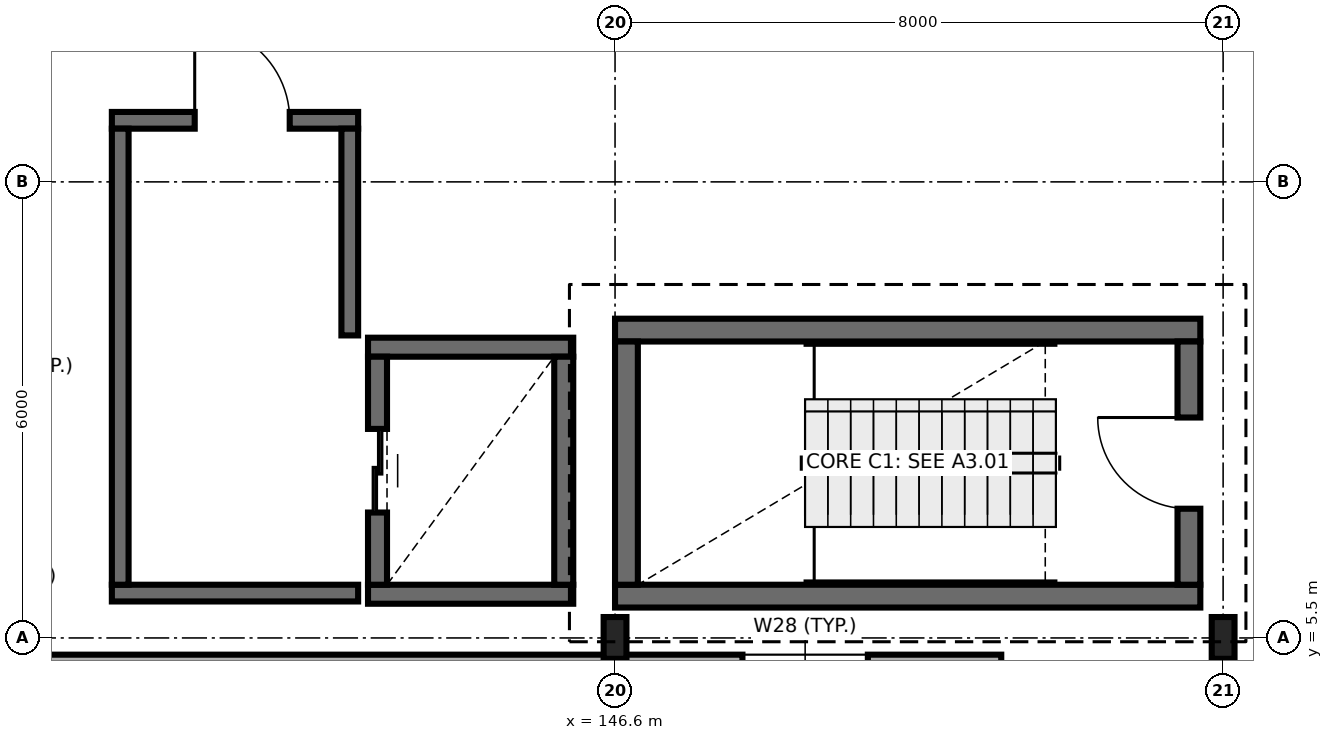
"""IFC4 building model, lengths in metres.
Left out: names, types, materials, properties, quantities, classifications, styles, units other than length and angle.
Written with IfcOpenShell. Run it as: python <this file> out.ifc"""

import sys

from ifc_helpers import new_model, si_unit, direction, frame, frame_2d, origin, origin_2d, place, context, subcontext, project, spatial, rectangle, i_section, extrude, element, fill, save


model = new_model("IFC4")
c1 = context("Model", 3, precision=1e-05, world=origin(), true_north=direction((0.0, 1.0)))
c2 = subcontext(c1, "Body", "Model", "MODEL_VIEW")
j1 = project(units=[si_unit("LENGTHUNIT", "METRE"), si_unit("PLANEANGLEUNIT", "RADIAN")], contexts=[c1])
p1 = place(None, origin())
s1 = spatial("IfcSite", under=j1, at=p1, CompositionType="ELEMENT")
p2 = place(p1, origin())
s2 = spatial("IfcBuilding", under=s1, at=p2, CompositionType="ELEMENT")
p3 = place(p2, frame((0.0, 0.0, 18.3)))
s3 = spatial("IfcBuildingStorey", under=s2, at=p3, CompositionType="ELEMENT", Elevation=18.3)
for number, where, z_axis, x_axis in (
    (1, (146.6, 5.5, 0.0), (0.0, 0.0, 1.0), (1.0, 0.0, 0.0)),
    (2, (154.6, 5.5, 0.0), (0.0, 0.0, 1.0), (1.0, 0.0, 0.0)),
):
    element("IfcColumn", number, at=place(p3, frame(where, z_axis=z_axis, x_axis=x_axis)), inside=s3, PredefinedType="COLUMN", context=c2, shape_type="SweptSolid", body=[
        extrude(i_section(OverallWidth=0.3, OverallDepth=0.55, WebThickness=0.015, FlangeThickness=0.029, FilletRadius=0.027, at=origin_2d()), origin(), (0.0, 0.0, 1.0), 4.5),
    ])
for number, where, z_axis, x_axis in (
    (3, (146.6, 6.05, 0.0), (0.0, 0.0, 1.0), (1.0, 0.0, 0.0)),
    (4, (154.3, 9.55, 0.0), (0.0, 0.0, 1.0), (-1.0, 0.0, 0.0)),
):
    element("IfcWall", number, at=place(p3, frame(where, z_axis=z_axis, x_axis=x_axis)), inside=s3, PredefinedType="SHEAR", context=c2, shape_type="SweptSolid", body=[
        extrude(rectangle(XDim=7.7, YDim=0.3, at=frame_2d((3.85, 0.0))), origin(), (0.0, 0.0, 1.0), 4.5),
    ])
p4 = place(p3, frame((146.75, 9.4, 0.0), z_axis=(0.0, 0.0, 1.0), x_axis=(0.0, -1.0, 0.0)))
e5 = element("IfcWall", 5, at=p4, inside=s3, PredefinedType="SHEAR", context=c2, shape_type="SweptSolid", body=[
    extrude(rectangle(XDim=3.2, YDim=0.3, at=frame_2d((1.6, 0.0))), origin(), (0.0, 0.0, 1.0), 4.5),
])
p5 = place(p3, frame((154.15, 6.2, 0.0), z_axis=(0.0, 0.0, 1.0), x_axis=(0.0, 1.0, 0.0)))
e6 = element("IfcWall", 6, at=p5, inside=s3, PredefinedType="SHEAR", context=c2, shape_type="SweptSolid", body=[
    extrude(rectangle(XDim=3.2, YDim=0.3, at=frame_2d((1.6, 0.0))), origin(), (0.0, 0.0, 1.0), 4.5),
])
p6 = place(p5, frame((1.0, 0.0, 0.0)))
e7 = element("IfcOpeningElement", 7, at=p6, cuts=e6, PredefinedType="OPENING", context=c2, shape_type="SweptSolid", body=[
    extrude(rectangle(XDim=1.2, YDim=2.15, at=frame_2d((0.6, 1.075))), frame((0.0, 0.16, 0.0), z_axis=(0.0, -1.0, 0.0), x_axis=(1.0, 0.0, 0.0)), (0.0, 0.0, 1.0), 0.32),
])
for number, where, z_axis, x_axis in (
    (8, (143.35, 6.075, 0.0), (0.0, 0.0, 1.0), (1.0, 0.0, 0.0)),
    (9, (146.05, 9.325, 0.0), (0.0, 0.0, 1.0), (-1.0, 0.0, 0.0)),
):
    element("IfcWall", number, at=place(p3, frame(where, z_axis=z_axis, x_axis=x_axis)), inside=s3, PredefinedType="SHEAR", context=c2, shape_type="SweptSolid", body=[
        extrude(rectangle(XDim=2.7, YDim=0.25, at=frame_2d((1.35, 0.0))), origin(), (0.0, 0.0, 1.0), 4.5),
    ])
p7 = place(p3, frame((143.475, 9.2, 0.0), z_axis=(0.0, 0.0, 1.0), x_axis=(0.0, -1.0, 0.0)))
e10 = element("IfcWall", 10, at=p7, inside=s3, PredefinedType="SHEAR", context=c2, shape_type="SweptSolid", body=[
    extrude(rectangle(XDim=3.0, YDim=0.25, at=frame_2d((1.5, 0.0))), origin(), (0.0, 0.0, 1.0), 4.5),
])
p8 = place(p7, frame((0.95, 0.0, 0.0)))
e11 = element("IfcOpeningElement", 11, at=p8, cuts=e10, PredefinedType="OPENING", context=c2, shape_type="SweptSolid", body=[
    extrude(rectangle(XDim=1.1, YDim=2.15, at=frame_2d((0.55, 1.075))), frame((0.0, 0.135, 0.0), z_axis=(0.0, -1.0, 0.0), x_axis=(1.0, 0.0, 0.0)), (0.0, 0.0, 1.0), 0.27),
])
p9 = place(p3, frame((145.925, 6.2, 0.0), z_axis=(0.0, 0.0, 1.0), x_axis=(0.0, 1.0, 0.0)))
e12 = element("IfcWall", 12, at=p9, inside=s3, PredefinedType="SHEAR", context=c2, shape_type="SweptSolid", body=[
    extrude(rectangle(XDim=3.0, YDim=0.25, at=frame_2d((1.5, 0.0))), origin(), (0.0, 0.0, 1.0), 4.5),
])
p10 = place(p3, frame((139.98, 6.09, 0.0), z_axis=(0.0, 0.0, 1.0), x_axis=(1.0, 0.0, 0.0)))
e13 = element("IfcWall", 13, at=p10, inside=s3, PredefinedType="SOLIDWALL", context=c2, shape_type="SweptSolid", body=[
    extrude(rectangle(XDim=3.24, YDim=0.22, at=frame_2d((1.62, 0.0))), origin(), (0.0, 0.0, 1.0), 4.28),
])
p11 = place(p3, frame((143.22, 12.31, 0.0), z_axis=(0.0, 0.0, 1.0), x_axis=(-1.0, 0.0, 0.0)))
e14 = element("IfcWall", 14, at=p11, inside=s3, PredefinedType="SOLIDWALL", context=c2, shape_type="SweptSolid", body=[
    extrude(rectangle(XDim=3.24, YDim=0.22, at=frame_2d((1.62, 0.0))), origin(), (0.0, 0.0, 1.0), 4.28),
])
p12 = place(p11, frame((0.9, 0.0, 0.0)))
e15 = element("IfcOpeningElement", 15, at=p12, cuts=e14, PredefinedType="OPENING", context=c2, shape_type="SweptSolid", body=[
    extrude(rectangle(XDim=1.25, YDim=2.15, at=frame_2d((0.625, 1.075))), frame((0.0, 0.12, 0.0), z_axis=(0.0, -1.0, 0.0), x_axis=(1.0, 0.0, 0.0)), (0.0, 0.0, 1.0), 0.24),
])
p13 = place(p3, frame((140.09, 12.2, 0.0), z_axis=(0.0, 0.0, 1.0), x_axis=(0.0, -1.0, 0.0)))
e16 = element("IfcWall", 16, at=p13, inside=s3, PredefinedType="SOLIDWALL", context=c2, shape_type="SweptSolid", body=[
    extrude(rectangle(XDim=6.0, YDim=0.22, at=frame_2d((3.0, 0.0))), origin(), (0.0, 0.0, 1.0), 4.28),
])
p14 = place(p3, frame((143.11, 9.48, 0.0), z_axis=(0.0, 0.0, 1.0), x_axis=(0.0, 1.0, 0.0)))
e17 = element("IfcWall", 17, at=p14, inside=s3, PredefinedType="SOLIDWALL", context=c2, shape_type="SweptSolid", body=[
    extrude(rectangle(XDim=2.72, YDim=0.22, at=frame_2d((1.36, 0.0))), origin(), (0.0, 0.0, 1.0), 4.28),
])
p15 = place(p3, frame((138.962, 5.09, 0.0), z_axis=(0.0, 0.0, 1.0), x_axis=(1.0, 0.0, 0.0)))
e18 = element("IfcWall", 18, at=p15, inside=s3, PredefinedType="SOLIDWALL", context=c2, shape_type="SweptSolid", body=[
    extrude(rectangle(XDim=12.719, YDim=0.38, at=frame_2d((6.359, 0.0))), origin(), (0.0, 0.0, 1.0), 4.28),
])
p16 = place(p15, frame((9.314, 0.0, 0.9)))
e19 = element("IfcOpeningElement", 19, at=p16, cuts=e18, PredefinedType="OPENING", context=c2, shape_type="SweptSolid", body=[
    extrude(rectangle(XDim=1.65, YDim=1.95, at=frame_2d((0.825, 0.975))), frame((0.0, 0.2, 0.0), z_axis=(0.0, -1.0, 0.0), x_axis=(1.0, 0.0, 0.0)), (0.0, 0.0, 1.0), 0.4),
])
p17 = place(p6, origin())
e20 = element("IfcDoor", 20, at=p17, inside=s3, OperationType="SINGLE_SWING_RIGHT", PredefinedType="DOOR", context=c2, shape_type="SweptSolid", body=[
    extrude(rectangle(XDim=1.2, YDim=2.15, at=frame_2d((0.6, 1.075))), frame((0.0, 0.025, 0.0), z_axis=(0.0, -1.0, 0.0), x_axis=(1.0, 0.0, 0.0)), (0.0, 0.0, 1.0), 0.05),
])
fill(e7, e20)
p18 = place(p8, origin())
e21 = element("IfcDoor", 21, at=p18, inside=s3, OperationType="DOUBLE_DOOR_SLIDING", PredefinedType="DOOR", context=c2, shape_type="SweptSolid", body=[
    extrude(rectangle(XDim=1.1, YDim=2.15, at=frame_2d((0.55, 1.075))), frame((0.0, 0.025, 0.0), z_axis=(0.0, -1.0, 0.0), x_axis=(1.0, 0.0, 0.0)), (0.0, 0.0, 1.0), 0.05),
])
fill(e11, e21)
p19 = place(p12, frame((1.25, 0.0, 0.0), z_axis=(0.0, 0.0, 1.0), x_axis=(-1.0, 0.0, 0.0)))
e22 = element("IfcDoor", 22, at=p19, inside=s3, OperationType="SINGLE_SWING_RIGHT", PredefinedType="DOOR", context=c2, shape_type="SweptSolid", body=[
    extrude(rectangle(XDim=1.25, YDim=2.15, at=frame_2d((0.625, 1.075))), frame((0.0, 0.025, 0.0), z_axis=(0.0, -1.0, 0.0), x_axis=(1.0, 0.0, 0.0)), (0.0, 0.0, 1.0), 0.05),
])
fill(e15, e22)
save(model, sys.argv[1])
